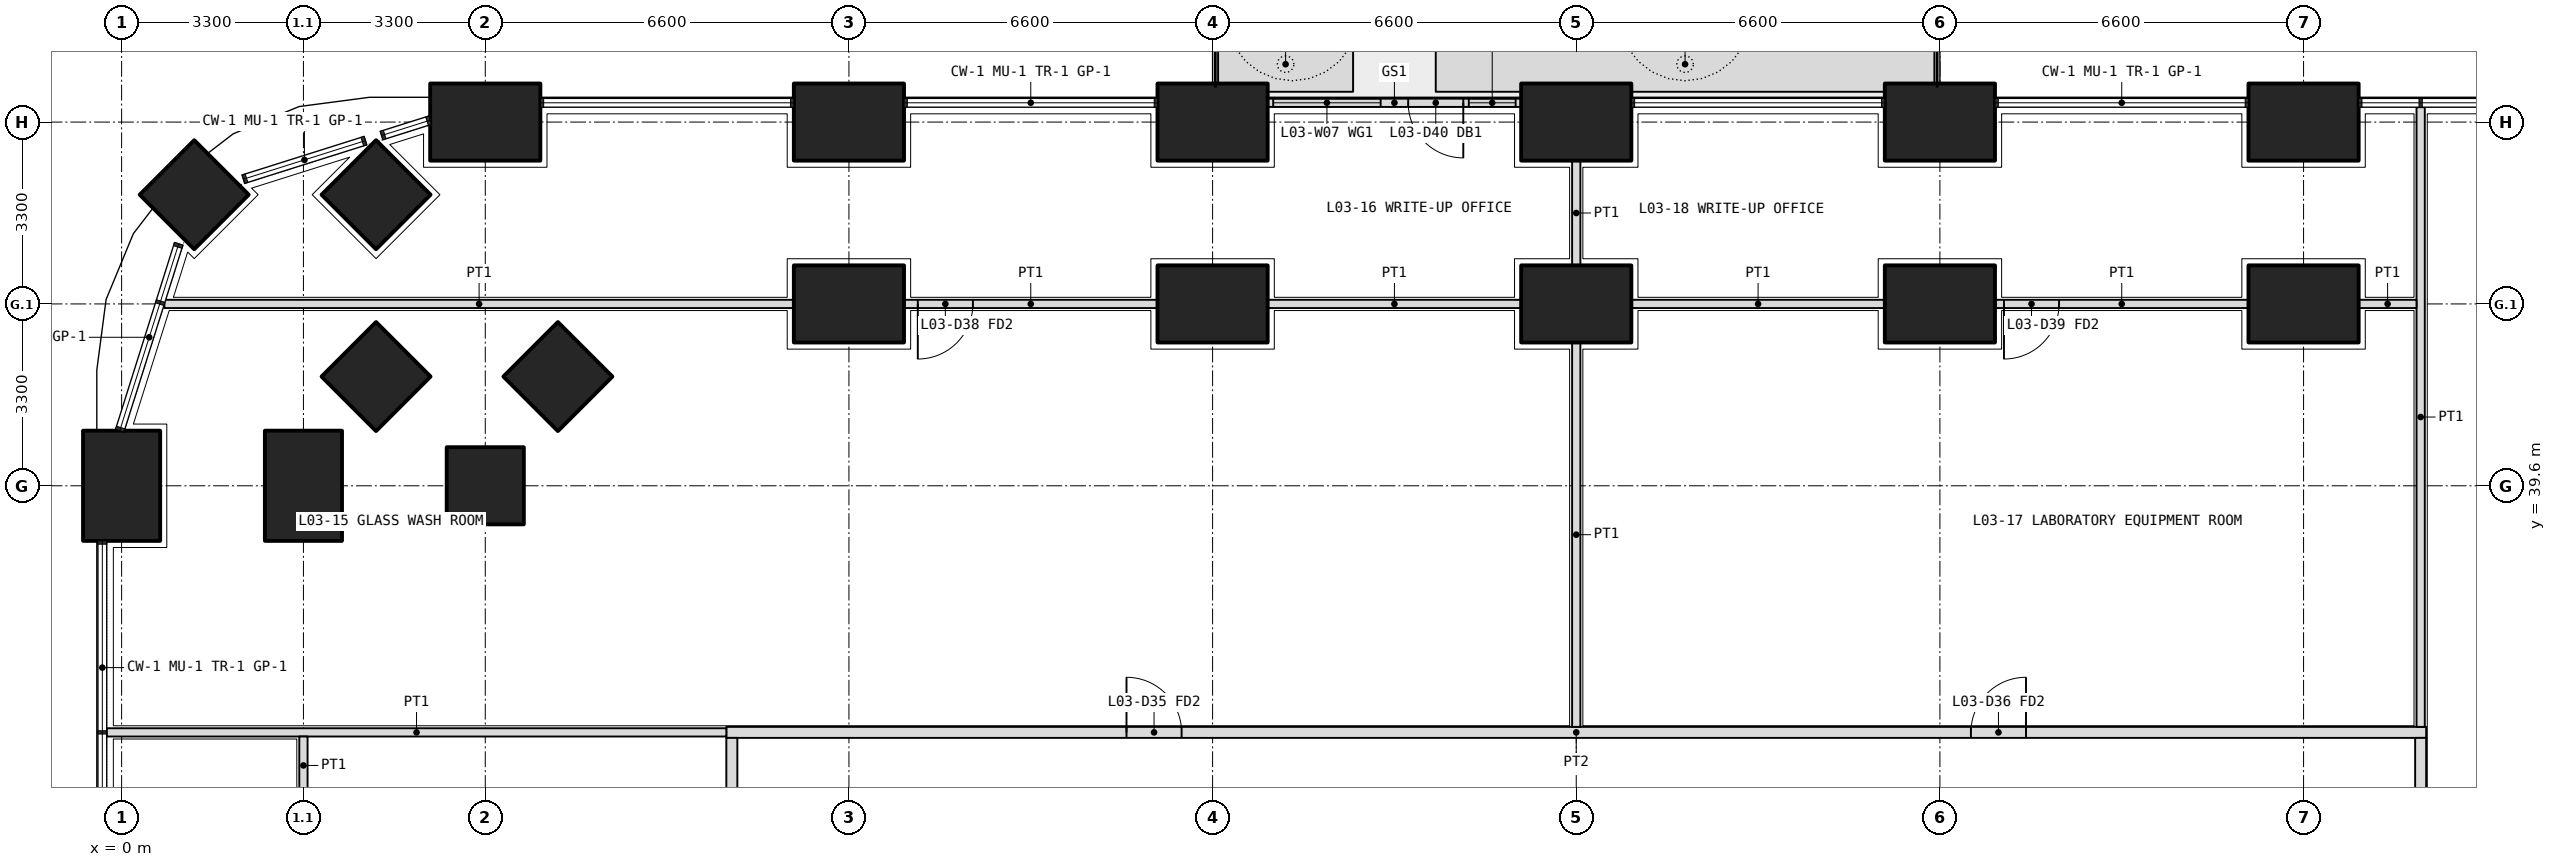
"""IFC4 building model, lengths in metres.
Left out: names, types, materials, properties, quantities, classifications, styles, units other than length and angle.
Written with IfcOpenShell. Run it as: python <this file> out.ifc"""

import sys

from ifc_helpers import new_model, si_unit, direction, frame, frame_2d, origin, origin_2d, place, context, subcontext, project, spatial, polyline, rectangle, outline, extrude, element, fill, save


model = new_model("IFC4")
c1 = context("Model", 3, precision=1e-05, world=origin(), true_north=direction((0.0, 1.0)))
c2 = subcontext(c1, "Body", "Model", "MODEL_VIEW")
j1 = project(units=[si_unit("LENGTHUNIT", "METRE"), si_unit("PLANEANGLEUNIT", "RADIAN")], contexts=[c1])
p1 = place(None, origin())
s1 = spatial("IfcSite", under=j1, at=p1, CompositionType="ELEMENT")
p2 = place(p1, origin())
s2 = spatial("IfcBuilding", under=s1, at=p2, CompositionType="ELEMENT")
p3 = place(p2, frame((0.0, 0.0, 17.1)))
s3 = spatial("IfcBuildingStorey", under=s2, at=p3, CompositionType="ELEMENT", Elevation=17.1)
p4 = place(p3, frame((1.318, 44.882, 0.0), z_axis=(0.0, 0.0, 1.0), x_axis=(0.707106781187, 0.707106781187, 0.0)))
e1 = element("IfcColumn", 1, at=p4, inside=s3, PredefinedType="COLUMN", context=c2, shape_type="SweptSolid", body=[
    extrude(rectangle(XDim=1.4, YDim=1.4, at=origin_2d()), origin(), (0.0, 0.0, 1.0), 4.2),
])
for number, where, z_axis, x_axis in (
    (2, (0.0, 39.6, 0.0), (0.0, 0.0, 1.0), (0.0, 1.0, 0.0)),
    (3, (6.6, 46.2, 0.0), (0.0, 0.0, 1.0), (1.0, 0.0, 0.0)),
    (4, (13.2, 46.2, 0.0), (0.0, 0.0, 1.0), (1.0, 0.0, 0.0)),
    (5, (19.8, 46.2, 0.0), (0.0, 0.0, 1.0), (1.0, 0.0, 0.0)),
    (6, (26.4, 46.2, 0.0), (0.0, 0.0, 1.0), (1.0, 0.0, 0.0)),
    (7, (33.0, 46.2, 0.0), (0.0, 0.0, 1.0), (1.0, 0.0, 0.0)),
    (8, (39.6, 46.2, 0.0), (0.0, 0.0, 1.0), (1.0, 0.0, 0.0)),
):
    element("IfcColumn", number, at=place(p3, frame(where, z_axis=z_axis, x_axis=x_axis)), inside=s3, PredefinedType="COLUMN", context=c2, shape_type="SweptSolid", body=[
        extrude(rectangle(XDim=2.0, YDim=1.4, at=origin_2d()), origin(), (0.0, 0.0, 1.0), 4.2),
    ])
for number, where, z_axis, x_axis in (
    (9, (6.6, 39.6, 0.0), (0.0, 0.0, 1.0), (1.0, 0.0, 0.0)),
    (10, (4.618, 44.882, 0.0), (0.0, 0.0, 1.0), (0.707, 0.707, 0.0)),
):
    element("IfcColumn", number, at=place(p3, frame(where, z_axis=z_axis, x_axis=x_axis)), inside=s3, PredefinedType="COLUMN", context=c2, shape_type="SweptSolid", body=[
        extrude(rectangle(XDim=1.4, YDim=1.4, at=origin_2d()), origin(), (0.0, 0.0, 1.0), 4.2),
    ])
p5 = place(p3, frame((3.3, 39.6, 0.0), z_axis=(0.0, 0.0, 1.0), x_axis=(0.0, 1.0, 0.0)))
e11 = element("IfcColumn", 11, at=p5, inside=s3, PredefinedType="COLUMN", context=c2, shape_type="SweptSolid", body=[
    extrude(rectangle(XDim=2.0, YDim=1.4, at=origin_2d()), origin(), (0.0, 0.0, 1.0), 4.2),
])
p6 = place(p3, frame((4.618, 41.582, 0.0), z_axis=(0.0, 0.0, 1.0), x_axis=(0.707106781187, 0.707106781187, 0.0)))
e12 = element("IfcColumn", 12, at=p6, inside=s3, PredefinedType="COLUMN", context=c2, shape_type="SweptSolid", body=[
    extrude(rectangle(XDim=1.4, YDim=1.4, at=origin_2d()), origin(), (0.0, 0.0, 1.0), 4.2),
])
for number, where, z_axis, x_axis in (
    (13, (13.2, 42.9, 0.0), (0.0, 0.0, 1.0), (1.0, 0.0, 0.0)),
    (14, (19.8, 42.9, 0.0), (0.0, 0.0, 1.0), (1.0, 0.0, 0.0)),
    (15, (26.4, 42.9, 0.0), (0.0, 0.0, 1.0), (1.0, 0.0, 0.0)),
    (16, (33.0, 42.9, 0.0), (0.0, 0.0, 1.0), (1.0, 0.0, 0.0)),
    (17, (39.6, 42.9, 0.0), (0.0, 0.0, 1.0), (1.0, 0.0, 0.0)),
):
    element("IfcColumn", number, at=place(p3, frame(where, z_axis=z_axis, x_axis=x_axis)), inside=s3, PredefinedType="COLUMN", context=c2, shape_type="SweptSolid", body=[
        extrude(rectangle(XDim=2.0, YDim=1.4, at=origin_2d()), origin(), (0.0, 0.0, 1.0), 4.2),
    ])
p7 = place(p3, frame((7.918, 41.582, 0.0), z_axis=(0.0, 0.0, 1.0), x_axis=(0.707106781187, 0.707106781187, 0.0)))
e18 = element("IfcColumn", 18, at=p7, inside=s3, PredefinedType="COLUMN", context=c2, shape_type="SweptSolid", body=[
    extrude(rectangle(XDim=1.4, YDim=1.4, at=origin_2d()), origin(), (0.0, 0.0, 1.0), 4.2),
])
p8 = place(p3, origin())
e19 = element("IfcWall", 19, at=p8, inside=s3, PredefinedType="USERDEFINED", context=c2, shape_type="SweptSolid", body=[
    extrude(outline(polyline([(19.9, 46.75), (22.35, 46.75), (22.35, 47.75), (19.9, 47.75), (19.9, 46.75)]), holes=[polyline([(20.05, 46.9), (22.2, 46.9), (22.2, 47.6), (20.05, 47.6), (20.05, 46.9)])]), origin(), (0.0, 0.0, 1.0), 1.05),
])
p9 = place(p3, origin())
e20 = element("IfcWall", 20, at=p9, inside=s3, PredefinedType="USERDEFINED", context=c2, shape_type="SweptSolid", body=[
    extrude(outline(polyline([(23.85, 46.75), (32.9, 46.75), (32.9, 47.75), (23.85, 47.75), (23.85, 46.75)]), holes=[polyline([(24.0, 46.9), (32.75, 46.9), (32.75, 47.6), (24.0, 47.6), (24.0, 46.9)])]), origin(), (0.0, 0.0, 1.0), 1.05),
])
p10 = place(p3, frame((25.4, 46.55, 0.0), z_axis=(0.0, 0.0, 1.0), x_axis=(-1.0, 0.0, 0.0)))
e21 = element("IfcWall", 21, at=p10, inside=s3, PredefinedType="SOLIDWALL", context=c2, shape_type="SweptSolid", body=[
    extrude(rectangle(XDim=4.6, YDim=0.15, at=frame_2d((2.3, 0.0))), origin(), (0.0, 0.0, 1.0), 2.7),
])
p11 = place(p10, frame((1.05, 0.0, 0.0)))
e22 = element("IfcOpeningElement", 22, at=p11, cuts=e21, PredefinedType="OPENING", context=c2, shape_type="SweptSolid", body=[
    extrude(rectangle(XDim=1.0, YDim=2.4, at=frame_2d((0.5, 1.2))), frame((0.0, 0.085, 0.0), z_axis=(0.0, -1.0, 0.0), x_axis=(1.0, 0.0, 0.0)), (0.0, 0.0, 1.0), 0.17),
])
p12 = place(p10, frame((0.1, 0.0, 0.1)))
e23 = element("IfcOpeningElement", 23, at=p12, cuts=e21, PredefinedType="OPENING", context=c2, shape_type="SweptSolid", body=[
    extrude(rectangle(XDim=0.85, YDim=2.3, at=frame_2d((0.425, 1.15))), frame((0.0, 0.085, 0.0), z_axis=(0.0, -1.0, 0.0), x_axis=(1.0, 0.0, 0.0)), (0.0, 0.0, 1.0), 0.17),
])
p13 = place(p10, frame((2.55, 0.0, 0.1)))
e24 = element("IfcOpeningElement", 24, at=p13, cuts=e21, PredefinedType="OPENING", context=c2, shape_type="SweptSolid", body=[
    extrude(rectangle(XDim=1.95, YDim=2.3, at=frame_2d((0.975, 1.15))), frame((0.0, 0.085, 0.0), z_axis=(0.0, -1.0, 0.0), x_axis=(1.0, 0.0, 0.0)), (0.0, 0.0, 1.0), 0.17),
])
p14 = place(p3, frame((10.975, 35.125, 0.0), z_axis=(0.0, 0.0, 1.0), x_axis=(1.0, 0.0, 0.0)))
e25 = element("IfcWall", 25, at=p14, inside=s3, PredefinedType="PARTITIONING", context=c2, shape_type="SweptSolid", body=[
    extrude(rectangle(XDim=30.85, YDim=0.2, at=frame_2d((15.425, 0.0))), origin(), (0.0, 0.0, 1.0), 2.85),
])
p15 = place(p14, frame((7.262, 0.0, 0.0)))
e26 = element("IfcOpeningElement", 26, at=p15, cuts=e25, PredefinedType="OPENING", context=c2, shape_type="SweptSolid", body=[
    extrude(rectangle(XDim=1.0, YDim=2.1, at=frame_2d((0.5, 1.05))), frame((0.0, 0.11, 0.0), z_axis=(0.0, -1.0, 0.0), x_axis=(1.0, 0.0, 0.0)), (0.0, 0.0, 1.0), 0.22),
])
p16 = place(p14, frame((22.587, 0.0, 0.0)))
e27 = element("IfcOpeningElement", 27, at=p16, cuts=e25, PredefinedType="OPENING", context=c2, shape_type="SweptSolid", body=[
    extrude(rectangle(XDim=1.0, YDim=2.1, at=frame_2d((0.5, 1.05))), frame((0.0, 0.11, 0.0), z_axis=(0.0, -1.0, 0.0), x_axis=(1.0, 0.0, 0.0)), (0.0, 0.0, 1.0), 0.22),
])
p17 = place(p3, frame((11.075, 11.175, 0.0), z_axis=(0.0, 0.0, 1.0), x_axis=(0.0, 1.0, 0.0)))
e28 = element("IfcWall", 28, at=p17, inside=s3, PredefinedType="PARTITIONING", context=c2, shape_type="SweptSolid", body=[
    extrude(rectangle(XDim=23.85, YDim=0.2, at=frame_2d((11.925, 0.0))), origin(), (0.0, 0.0, 1.0), 2.85),
])
p18 = place(p17, frame((0.462, 0.0, 0.0)))
e29 = element("IfcOpeningElement", 29, at=p18, cuts=e28, PredefinedType="OPENING", context=c2, shape_type="SweptSolid", body=[
    extrude(rectangle(XDim=1.0, YDim=2.1, at=frame_2d((0.5, 1.05))), frame((0.0, 0.11, 0.0), z_axis=(0.0, -1.0, 0.0), x_axis=(1.0, 0.0, 0.0)), (0.0, 0.0, 1.0), 0.22),
])
p19 = place(p17, frame((2.575, 0.0, 0.0)))
e30 = element("IfcOpeningElement", 30, at=p19, cuts=e28, PredefinedType="OPENING", context=c2, shape_type="SweptSolid", body=[
    extrude(rectangle(XDim=1.0, YDim=2.1, at=frame_2d((0.5, 1.05))), frame((0.0, 0.11, 0.0), z_axis=(0.0, -1.0, 0.0), x_axis=(1.0, 0.0, 0.0)), (0.0, 0.0, 1.0), 0.22),
])
p20 = place(p17, frame((5.65, 0.0, 0.0)))
e31 = element("IfcOpeningElement", 31, at=p20, cuts=e28, PredefinedType="OPENING", context=c2, shape_type="SweptSolid", body=[
    extrude(rectangle(XDim=0.9, YDim=2.1, at=frame_2d((0.45, 1.05))), frame((0.0, 0.11, 0.0), z_axis=(0.0, -1.0, 0.0), x_axis=(1.0, 0.0, 0.0)), (0.0, 0.0, 1.0), 0.22),
])
p21 = place(p17, frame((9.5, 0.0, 0.0)))
e32 = element("IfcOpeningElement", 32, at=p21, cuts=e28, PredefinedType="OPENING", context=c2, shape_type="SweptSolid", body=[
    extrude(rectangle(XDim=0.9, YDim=2.1, at=frame_2d((0.45, 1.05))), frame((0.0, 0.11, 0.0), z_axis=(0.0, -1.0, 0.0), x_axis=(1.0, 0.0, 0.0)), (0.0, 0.0, 1.0), 0.22),
])
p22 = place(p17, frame((13.025, 0.0, 0.0)))
e33 = element("IfcOpeningElement", 33, at=p22, cuts=e28, PredefinedType="OPENING", context=c2, shape_type="SweptSolid", body=[
    extrude(rectangle(XDim=1.0, YDim=2.1, at=frame_2d((0.5, 1.05))), frame((0.0, 0.11, 0.0), z_axis=(0.0, -1.0, 0.0), x_axis=(1.0, 0.0, 0.0)), (0.0, 0.0, 1.0), 0.22),
])
p23 = place(p17, frame((16.375, 0.0, 0.0)))
e34 = element("IfcOpeningElement", 34, at=p23, cuts=e28, PredefinedType="OPENING", context=c2, shape_type="SweptSolid", body=[
    extrude(rectangle(XDim=1.0, YDim=2.1, at=frame_2d((0.5, 1.05))), frame((0.0, 0.11, 0.0), z_axis=(0.0, -1.0, 0.0), x_axis=(1.0, 0.0, 0.0)), (0.0, 0.0, 1.0), 0.22),
])
p24 = place(p17, frame((20.738, 0.0, 0.0)))
e35 = element("IfcOpeningElement", 35, at=p24, cuts=e28, PredefinedType="OPENING", context=c2, shape_type="SweptSolid", body=[
    extrude(rectangle(XDim=1.0, YDim=2.1, at=frame_2d((0.5, 1.05))), frame((0.0, 0.11, 0.0), z_axis=(0.0, -1.0, 0.0), x_axis=(1.0, 0.0, 0.0)), (0.0, 0.0, 1.0), 0.22),
])
p25 = place(p3, frame((41.725, 11.175, 0.0), z_axis=(0.0, 0.0, 1.0), x_axis=(0.0, 1.0, 0.0)))
e36 = element("IfcWall", 36, at=p25, inside=s3, PredefinedType="PARTITIONING", context=c2, shape_type="SweptSolid", body=[
    extrude(rectangle(XDim=23.85, YDim=0.2, at=frame_2d((11.925, 0.0))), origin(), (0.0, 0.0, 1.0), 2.85),
])
p26 = place(p25, frame((3.762, 0.0, 0.0)))
e37 = element("IfcOpeningElement", 37, at=p26, cuts=e36, PredefinedType="OPENING", context=c2, shape_type="SweptSolid", body=[
    extrude(rectangle(XDim=1.0, YDim=2.1, at=frame_2d((0.5, 1.05))), frame((0.0, 0.11, 0.0), z_axis=(0.0, -1.0, 0.0), x_axis=(1.0, 0.0, 0.0)), (0.0, 0.0, 1.0), 0.22),
])
p27 = place(p25, frame((9.725, 0.0, 0.0)))
e38 = element("IfcOpeningElement", 38, at=p27, cuts=e36, PredefinedType="OPENING", context=c2, shape_type="SweptSolid", body=[
    extrude(rectangle(XDim=1.0, YDim=2.1, at=frame_2d((0.5, 1.05))), frame((0.0, 0.11, 0.0), z_axis=(0.0, -1.0, 0.0), x_axis=(1.0, 0.0, 0.0)), (0.0, 0.0, 1.0), 0.22),
])
p28 = place(p25, frame((13.075, 0.0, 0.0)))
e39 = element("IfcOpeningElement", 39, at=p28, cuts=e36, PredefinedType="OPENING", context=c2, shape_type="SweptSolid", body=[
    extrude(rectangle(XDim=0.9, YDim=2.1, at=frame_2d((0.45, 1.05))), frame((0.0, 0.11, 0.0), z_axis=(0.0, -1.0, 0.0), x_axis=(1.0, 0.0, 0.0)), (0.0, 0.0, 1.0), 0.22),
])
p29 = place(p25, frame((18.988, 0.0, 0.0)))
e40 = element("IfcOpeningElement", 40, at=p29, cuts=e36, PredefinedType="OPENING", context=c2, shape_type="SweptSolid", body=[
    extrude(rectangle(XDim=1.2, YDim=2.1, at=frame_2d((0.6, 1.05))), frame((0.0, 0.11, 0.0), z_axis=(0.0, -1.0, 0.0), x_axis=(1.0, 0.0, 0.0)), (0.0, 0.0, 1.0), 0.22),
])
p30 = place(p3, frame((41.725, 46.47, 0.0), z_axis=(0.0, 0.0, 1.0), x_axis=(0.0, -1.0, 0.0)))
e41 = element("IfcWall", 41, at=p30, inside=s3, PredefinedType="PARTITIONING", context=c2, shape_type="SweptSolid", body=[
    extrude(rectangle(XDim=11.245, YDim=0.15, at=frame_2d((5.623, 0.0))), origin(), (0.0, 0.0, 1.0), 2.7),
])
p31 = place(p3, frame((-0.27, 35.125, 0.0), z_axis=(0.0, 0.0, 1.0), x_axis=(1.0, 0.0, 0.0)))
e42 = element("IfcWall", 42, at=p31, inside=s3, PredefinedType="PARTITIONING", context=c2, shape_type="SweptSolid", body=[
    extrude(rectangle(XDim=11.245, YDim=0.15, at=frame_2d((5.623, 0.0))), origin(), (0.0, 0.0, 1.0), 2.7),
])
p32 = place(p3, frame((41.65, 42.9, 0.0), z_axis=(0.0, 0.0, 1.0), x_axis=(-1.0, 0.0, 0.0)))
e43 = element("IfcWall", 43, at=p32, inside=s3, PredefinedType="PARTITIONING", context=c2, shape_type="SweptSolid", body=[
    extrude(rectangle(XDim=1.05, YDim=0.15, at=frame_2d((0.525, 0.0))), origin(), (0.0, 0.0, 1.0), 3.9),
])
p33 = place(p3, frame((38.6, 42.9, 0.0), z_axis=(0.0, 0.0, 1.0), x_axis=(-1.0, 0.0, 0.0)))
e44 = element("IfcWall", 44, at=p33, inside=s3, PredefinedType="PARTITIONING", context=c2, shape_type="SweptSolid", body=[
    extrude(rectangle(XDim=4.6, YDim=0.15, at=frame_2d((2.3, 0.0))), origin(), (0.0, 0.0, 1.0), 3.9),
])
p34 = place(p33, frame((3.438, 0.0, 0.0)))
e45 = element("IfcOpeningElement", 45, at=p34, cuts=e44, PredefinedType="OPENING", context=c2, shape_type="SweptSolid", body=[
    extrude(rectangle(XDim=1.0, YDim=2.1, at=frame_2d((0.5, 1.05))), frame((0.0, 0.085, 0.0), z_axis=(0.0, -1.0, 0.0), x_axis=(1.0, 0.0, 0.0)), (0.0, 0.0, 1.0), 0.17),
])
p35 = place(p3, frame((32.0, 42.9, 0.0), z_axis=(0.0, 0.0, 1.0), x_axis=(-1.0, 0.0, 0.0)))
e46 = element("IfcWall", 46, at=p35, inside=s3, PredefinedType="PARTITIONING", context=c2, shape_type="SweptSolid", body=[
    extrude(rectangle(XDim=4.6, YDim=0.15, at=frame_2d((2.3, 0.0))), origin(), (0.0, 0.0, 1.0), 3.9),
])
p36 = place(p3, frame((25.4, 42.9, 0.0), z_axis=(0.0, 0.0, 1.0), x_axis=(-1.0, 0.0, 0.0)))
e47 = element("IfcWall", 47, at=p36, inside=s3, PredefinedType="PARTITIONING", context=c2, shape_type="SweptSolid", body=[
    extrude(rectangle(XDim=4.6, YDim=0.15, at=frame_2d((2.3, 0.0))), origin(), (0.0, 0.0, 1.0), 3.9),
])
p37 = place(p3, frame((18.8, 42.9, 0.0), z_axis=(0.0, 0.0, 1.0), x_axis=(-1.0, 0.0, 0.0)))
e48 = element("IfcWall", 48, at=p37, inside=s3, PredefinedType="PARTITIONING", context=c2, shape_type="SweptSolid", body=[
    extrude(rectangle(XDim=4.6, YDim=0.15, at=frame_2d((2.3, 0.0))), origin(), (0.0, 0.0, 1.0), 3.9),
])
p38 = place(p37, frame((3.35, 0.0, 0.0)))
e49 = element("IfcOpeningElement", 49, at=p38, cuts=e48, PredefinedType="OPENING", context=c2, shape_type="SweptSolid", body=[
    extrude(rectangle(XDim=1.0, YDim=2.1, at=frame_2d((0.5, 1.05))), frame((0.0, 0.085, 0.0), z_axis=(0.0, -1.0, 0.0), x_axis=(1.0, 0.0, 0.0)), (0.0, 0.0, 1.0), 0.17),
])
p39 = place(p3, frame((12.2, 42.9, 0.0), z_axis=(0.0, 0.0, 1.0), x_axis=(-1.0, 0.0, 0.0)))
e50 = element("IfcWall", 50, at=p39, inside=s3, PredefinedType="PARTITIONING", context=c2, shape_type="SweptSolid", body=[
    extrude(rectangle(XDim=11.424, YDim=0.15, at=frame_2d((5.712, 0.0))), origin(), (0.0, 0.0, 1.0), 2.7),
])
p40 = place(p3, frame((26.4, 45.5, 0.0), z_axis=(0.0, 0.0, 1.0), x_axis=(0.0, -1.0, 0.0)))
e51 = element("IfcWall", 51, at=p40, inside=s3, PredefinedType="PARTITIONING", context=c2, shape_type="SweptSolid", body=[
    extrude(rectangle(XDim=1.9, YDim=0.15, at=frame_2d((0.95, 0.0))), origin(), (0.0, 0.0, 1.0), 2.85),
])
p41 = place(p3, frame((26.4, 42.2, 0.0), z_axis=(0.0, 0.0, 1.0), x_axis=(0.0, -1.0, 0.0)))
e52 = element("IfcWall", 52, at=p41, inside=s3, PredefinedType="PARTITIONING", context=c2, shape_type="SweptSolid", body=[
    extrude(rectangle(XDim=6.975, YDim=0.15, at=frame_2d((3.487, 0.0))), origin(), (0.0, 0.0, 1.0), 2.85),
])
p42 = place(p3, frame((3.3, 35.05, 0.0), z_axis=(0.0, 0.0, 1.0), x_axis=(0.0, -1.0, 0.0)))
e53 = element("IfcWall", 53, at=p42, inside=s3, PredefinedType="PARTITIONING", context=c2, shape_type="SweptSolid", body=[
    extrude(rectangle(XDim=1.05, YDim=0.15, at=frame_2d((0.525, 0.0))), origin(), (0.0, 0.0, 1.0), 3.9),
])
p43 = place(p11, origin())
e54 = element("IfcDoor", 54, at=p43, inside=s3, OperationType="SINGLE_SWING_LEFT", PredefinedType="DOOR", context=c2, shape_type="SweptSolid", body=[
    extrude(rectangle(XDim=1.0, YDim=2.4, at=frame_2d((0.5, 1.2))), frame((0.0, 0.025, 0.0), z_axis=(0.0, -1.0, 0.0), x_axis=(1.0, 0.0, 0.0)), (0.0, 0.0, 1.0), 0.05),
])
fill(e22, e54)
p44 = place(p12, origin())
e55 = element("IfcWindow", 55, at=p44, inside=s3, PartitioningType="SINGLE_PANEL", PredefinedType="WINDOW", context=c2, shape_type="SweptSolid", body=[
    extrude(rectangle(XDim=0.85, YDim=2.3, at=frame_2d((0.425, 1.15))), frame((0.0, 0.03, 0.0), z_axis=(0.0, -1.0, 0.0), x_axis=(1.0, 0.0, 0.0)), (0.0, 0.0, 1.0), 0.06),
])
fill(e23, e55)
p45 = place(p13, origin())
e56 = element("IfcWindow", 56, at=p45, inside=s3, PartitioningType="SINGLE_PANEL", PredefinedType="WINDOW", context=c2, shape_type="SweptSolid", body=[
    extrude(rectangle(XDim=1.95, YDim=2.3, at=frame_2d((0.975, 1.15))), frame((0.0, 0.03, 0.0), z_axis=(0.0, -1.0, 0.0), x_axis=(1.0, 0.0, 0.0)), (0.0, 0.0, 1.0), 0.06),
])
fill(e24, e56)
p46 = place(p15, origin())
e57 = element("IfcDoor", 57, at=p46, inside=s3, OperationType="SINGLE_SWING_LEFT", PredefinedType="DOOR", context=c2, shape_type="SweptSolid", body=[
    extrude(rectangle(XDim=1.0, YDim=2.1, at=frame_2d((0.5, 1.05))), frame((0.0, 0.025, 0.0), z_axis=(0.0, -1.0, 0.0), x_axis=(1.0, 0.0, 0.0)), (0.0, 0.0, 1.0), 0.05),
])
fill(e26, e57)
p47 = place(p38, origin())
e58 = element("IfcDoor", 58, at=p47, inside=s3, OperationType="SINGLE_SWING_RIGHT", PredefinedType="DOOR", context=c2, shape_type="SweptSolid", body=[
    extrude(rectangle(XDim=1.0, YDim=2.1, at=frame_2d((0.5, 1.05))), frame((0.0, 0.025, 0.0), z_axis=(0.0, -1.0, 0.0), x_axis=(1.0, 0.0, 0.0)), (0.0, 0.0, 1.0), 0.05),
])
fill(e49, e58)
p48 = place(p16, origin())
e59 = element("IfcDoor", 59, at=p48, inside=s3, OperationType="SINGLE_SWING_RIGHT", PredefinedType="DOOR", context=c2, shape_type="SweptSolid", body=[
    extrude(rectangle(XDim=1.0, YDim=2.1, at=frame_2d((0.5, 1.05))), frame((0.0, 0.025, 0.0), z_axis=(0.0, -1.0, 0.0), x_axis=(1.0, 0.0, 0.0)), (0.0, 0.0, 1.0), 0.05),
])
fill(e27, e59)
p49 = place(p34, origin())
e60 = element("IfcDoor", 60, at=p49, inside=s3, OperationType="SINGLE_SWING_RIGHT", PredefinedType="DOOR", context=c2, shape_type="SweptSolid", body=[
    extrude(rectangle(XDim=1.0, YDim=2.1, at=frame_2d((0.5, 1.05))), frame((0.0, 0.025, 0.0), z_axis=(0.0, -1.0, 0.0), x_axis=(1.0, 0.0, 0.0)), (0.0, 0.0, 1.0), 0.05),
])
fill(e45, e60)
save(model, sys.argv[1])
